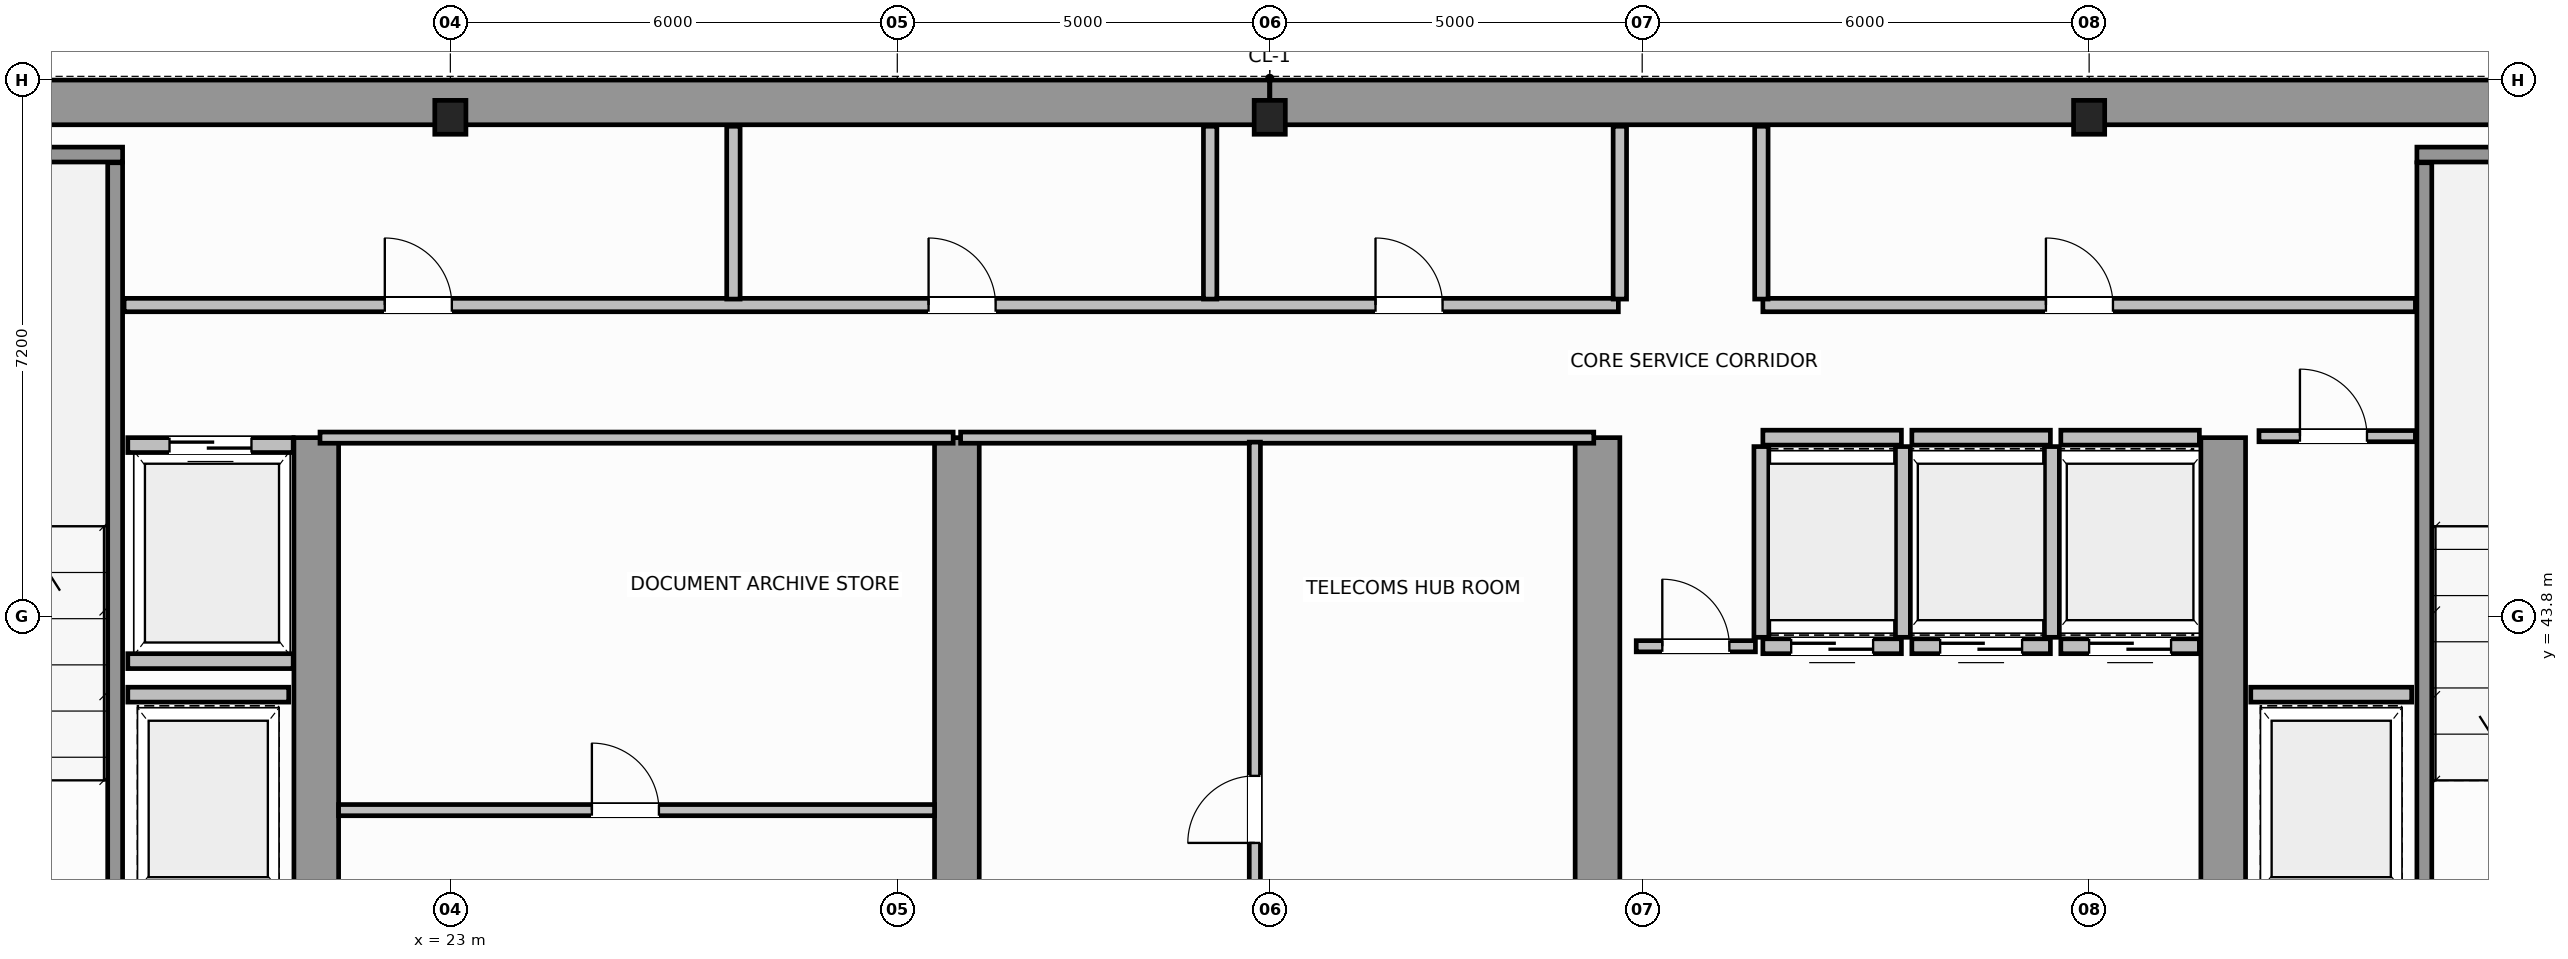
"""IFC4 building model, lengths in metres.
Left out: names, types, materials, properties, quantities, classifications, styles, units other than length and angle.
Written with IfcOpenShell. Run it as: python <this file> out.ifc"""

import sys

from ifc_helpers import new_model, si_unit, direction, frame, frame_2d, origin, origin_2d, place, context, subcontext, project, spatial, rectangle, i_section, extrude, source, transform, mapped, element, fill, save


model = new_model("IFC4")
c1 = context("Model", 3, precision=1e-05, world=origin(), true_north=direction((0.0, 1.0)))
c2 = subcontext(c1, "Body", "Model", "MODEL_VIEW")
j1 = project(units=[si_unit("LENGTHUNIT", "METRE"), si_unit("PLANEANGLEUNIT", "RADIAN")], contexts=[c1])
p1 = place(None, origin())
s1 = spatial("IfcSite", under=j1, at=p1, CompositionType="ELEMENT")
p2 = place(p1, origin())
s2 = spatial("IfcBuilding", under=s1, at=p2, CompositionType="ELEMENT")
p3 = place(p2, frame((0.0, 0.0, 227.0)))
s3 = spatial("IfcBuildingStorey", under=s2, at=p3, CompositionType="ELEMENT", Elevation=227.0)
m1 = source(origin(), c2, "Body", "SweptSolid", [
    extrude(i_section(OverallWidth=0.418, OverallDepth=0.455, WebThickness=0.042, FlangeThickness=0.058, FilletRadius=0.015, at=origin_2d()), origin(), (0.0, 0.0, 1.0), 3.8),
])
for number, where, z_axis, x_axis in (
    (1, (23.0, 50.5, 0.0), (0.0, 0.0, 1.0), (1.0, 0.0, 0.0)),
    (2, (34.0, 50.5, 0.0), (0.0, 0.0, 1.0), (1.0, 0.0, 0.0)),
    (3, (45.0, 50.5, 0.0), (0.0, 0.0, 1.0), (1.0, 0.0, 0.0)),
):
    element("IfcColumn", number, at=place(p3, frame(where, z_axis=z_axis, x_axis=x_axis)), inside=s3, PredefinedType="COLUMN", context=c2, shape_type="MappedRepresentation", body=[
        mapped(m1, transform((0.0, 0.0, 0.0), scale=1.0)),
    ])
for number, where, z_axis, x_axis in (
    (4, (14.304, 50.7, 0.0), (0.0, 0.0, 1.0), (1.0, 0.0, 0.0)),
    (5, (34.002, 50.7, 0.0), (0.0, 0.0, 1.0), (1.0, 0.0, 0.0)),
):
    element("IfcWall", number, at=place(p3, frame(where, z_axis=z_axis, x_axis=x_axis)), inside=s3, PredefinedType="SHEAR", context=c2, shape_type="SweptSolid", body=[
        extrude(rectangle(XDim=19.694, YDim=0.6, at=frame_2d((9.847, 0.0))), origin(), (0.0, 0.0, 1.0), 3.8),
    ])
for number, where, z_axis, x_axis in (
    (6, (21.2, 36.82, 0.0), (0.0, 0.0, 1.0), (0.0, 1.0, 0.0)),
    (7, (29.8, 36.82, 0.0), (0.0, 0.0, 1.0), (0.0, 1.0, 0.0)),
    (8, (38.4, 36.82, 0.0), (0.0, 0.0, 1.0), (0.0, 1.0, 0.0)),
    (9, (46.8, 36.82, 0.0), (0.0, 0.0, 1.0), (0.0, 1.0, 0.0)),
):
    element("IfcWall", number, at=place(p3, frame(where, z_axis=z_axis, x_axis=x_axis)), inside=s3, PredefinedType="SHEAR", context=c2, shape_type="SweptSolid", body=[
        extrude(rectangle(XDim=9.38, YDim=0.6, at=frame_2d((4.69, 0.0))), origin(), (0.0, 0.0, 1.0), 3.8),
    ])
p4 = place(p3, frame((14.3, 50.0, 0.0), z_axis=(0.0, 0.0, 1.0), x_axis=(1.0, 0.0, 0.0)))
e10 = element("IfcWall", 10, at=p4, inside=s3, PredefinedType="SOLIDWALL", context=c2, shape_type="SweptSolid", body=[
    extrude(rectangle(XDim=4.3, YDim=0.2, at=frame_2d((2.15, 0.0))), origin(), (0.0, 0.0, 1.0), 3.8),
])
p5 = place(p3, frame((18.5, 39.96, 0.0), z_axis=(0.0, 0.0, 1.0), x_axis=(0.0, 1.0, 0.0)))
e11 = element("IfcWall", 11, at=p5, inside=s3, PredefinedType="SOLIDWALL", context=c2, shape_type="SweptSolid", body=[
    extrude(rectangle(XDim=9.93, YDim=0.2, at=frame_2d((4.965, 0.0))), origin(), (0.0, 0.0, 1.0), 3.8),
])
p6 = place(p3, frame((49.4, 50.0, 0.0), z_axis=(0.0, 0.0, 1.0), x_axis=(1.0, 0.0, 0.0)))
e12 = element("IfcWall", 12, at=p6, inside=s3, PredefinedType="SOLIDWALL", context=c2, shape_type="SweptSolid", body=[
    extrude(rectangle(XDim=4.3, YDim=0.2, at=frame_2d((2.15, 0.0))), origin(), (0.0, 0.0, 1.0), 3.8),
])
p7 = place(p3, frame((49.5, 39.96, 0.0), z_axis=(0.0, 0.0, 1.0), x_axis=(0.0, 1.0, 0.0)))
e13 = element("IfcWall", 13, at=p7, inside=s3, PredefinedType="SOLIDWALL", context=c2, shape_type="SweptSolid", body=[
    extrude(rectangle(XDim=9.93, YDim=0.2, at=frame_2d((4.965, 0.0))), origin(), (0.0, 0.0, 1.0), 3.8),
])
p8 = place(p3, frame((40.62, 43.4, 0.0), z_axis=(0.0, 0.0, 1.0), x_axis=(1.0, 0.0, 0.0)))
e14 = element("IfcWall", 14, at=p8, inside=s3, PredefinedType="SOLIDWALL", context=c2, shape_type="SweptSolid", body=[
    extrude(rectangle(XDim=1.86, YDim=0.2, at=frame_2d((0.93, 0.0))), origin(), (0.0, 0.0, 1.0), 3.58),
])
p9 = place(p8, frame((0.38, 0.0, 0.0)))
e15 = element("IfcOpeningElement", 15, at=p9, cuts=e14, PredefinedType="OPENING", context=c2, shape_type="SweptSolid", body=[
    extrude(rectangle(XDim=1.1, YDim=2.15, at=frame_2d((0.55, 1.075))), frame((0.0, 0.11, 0.0), z_axis=(0.0, -1.0, 0.0), x_axis=(1.0, 0.0, 0.0)), (0.0, 0.0, 1.0), 0.22),
])
p10 = place(p3, frame((40.62, 46.2, 0.0), z_axis=(0.0, 0.0, 1.0), x_axis=(1.0, 0.0, 0.0)))
e16 = element("IfcWall", 16, at=p10, inside=s3, PredefinedType="SOLIDWALL", context=c2, shape_type="SweptSolid", body=[
    extrude(rectangle(XDim=1.86, YDim=0.2, at=frame_2d((0.93, 0.0))), origin(), (0.0, 0.0, 1.0), 3.58),
])
for number, where, z_axis, x_axis in (
    (17, (40.6, 43.52, 0.0), (0.0, 0.0, 1.0), (0.0, 1.0, 0.0)),
    (18, (42.5, 43.52, 0.0), (0.0, 0.0, 1.0), (0.0, 1.0, 0.0)),
):
    element("IfcWall", number, at=place(p3, frame(where, z_axis=z_axis, x_axis=x_axis)), inside=s3, PredefinedType="SOLIDWALL", context=c2, shape_type="SweptSolid", body=[
        extrude(rectangle(XDim=2.56, YDim=0.2, at=frame_2d((1.28, 0.0))), origin(), (0.0, 0.0, 1.0), 3.58),
    ])
p11 = place(p3, frame((42.62, 43.4, 0.0), z_axis=(0.0, 0.0, 1.0), x_axis=(1.0, 0.0, 0.0)))
e19 = element("IfcWall", 19, at=p11, inside=s3, PredefinedType="SOLIDWALL", context=c2, shape_type="SweptSolid", body=[
    extrude(rectangle(XDim=1.86, YDim=0.2, at=frame_2d((0.93, 0.0))), origin(), (0.0, 0.0, 1.0), 3.58),
])
p12 = place(p11, frame((0.38, 0.0, 0.0)))
e20 = element("IfcOpeningElement", 20, at=p12, cuts=e19, PredefinedType="OPENING", context=c2, shape_type="SweptSolid", body=[
    extrude(rectangle(XDim=1.1, YDim=2.15, at=frame_2d((0.55, 1.075))), frame((0.0, 0.11, 0.0), z_axis=(0.0, -1.0, 0.0), x_axis=(1.0, 0.0, 0.0)), (0.0, 0.0, 1.0), 0.22),
])
p13 = place(p3, frame((42.62, 46.2, 0.0), z_axis=(0.0, 0.0, 1.0), x_axis=(1.0, 0.0, 0.0)))
e21 = element("IfcWall", 21, at=p13, inside=s3, PredefinedType="SOLIDWALL", context=c2, shape_type="SweptSolid", body=[
    extrude(rectangle(XDim=1.86, YDim=0.2, at=frame_2d((0.93, 0.0))), origin(), (0.0, 0.0, 1.0), 3.58),
])
p14 = place(p3, frame((44.5, 43.52, 0.0), z_axis=(0.0, 0.0, 1.0), x_axis=(0.0, 1.0, 0.0)))
e22 = element("IfcWall", 22, at=p14, inside=s3, PredefinedType="SOLIDWALL", context=c2, shape_type="SweptSolid", body=[
    extrude(rectangle(XDim=2.56, YDim=0.2, at=frame_2d((1.28, 0.0))), origin(), (0.0, 0.0, 1.0), 3.58),
])
p15 = place(p3, frame((44.62, 43.4, 0.0), z_axis=(0.0, 0.0, 1.0), x_axis=(1.0, 0.0, 0.0)))
e23 = element("IfcWall", 23, at=p15, inside=s3, PredefinedType="SOLIDWALL", context=c2, shape_type="SweptSolid", body=[
    extrude(rectangle(XDim=1.86, YDim=0.2, at=frame_2d((0.93, 0.0))), origin(), (0.0, 0.0, 1.0), 3.58),
])
p16 = place(p15, frame((0.38, 0.0, 0.0)))
e24 = element("IfcOpeningElement", 24, at=p16, cuts=e23, PredefinedType="OPENING", context=c2, shape_type="SweptSolid", body=[
    extrude(rectangle(XDim=1.1, YDim=2.15, at=frame_2d((0.55, 1.075))), frame((0.0, 0.11, 0.0), z_axis=(0.0, -1.0, 0.0), x_axis=(1.0, 0.0, 0.0)), (0.0, 0.0, 1.0), 0.22),
])
p17 = place(p3, frame((44.62, 46.2, 0.0), z_axis=(0.0, 0.0, 1.0), x_axis=(1.0, 0.0, 0.0)))
e25 = element("IfcWall", 25, at=p17, inside=s3, PredefinedType="SOLIDWALL", context=c2, shape_type="SweptSolid", body=[
    extrude(rectangle(XDim=1.86, YDim=0.2, at=frame_2d((0.93, 0.0))), origin(), (0.0, 0.0, 1.0), 3.58),
])
p18 = place(p3, frame((18.67, 46.1, 0.0), z_axis=(0.0, 0.0, 1.0), x_axis=(1.0, 0.0, 0.0)))
e26 = element("IfcWall", 26, at=p18, inside=s3, PredefinedType="SOLIDWALL", context=c2, shape_type="SweptSolid", body=[
    extrude(rectangle(XDim=2.22, YDim=0.2, at=frame_2d((1.11, 0.0))), origin(), (0.0, 0.0, 1.0), 3.58),
])
p19 = place(p18, frame((0.56, 0.0, 0.0)))
e27 = element("IfcOpeningElement", 27, at=p19, cuts=e26, PredefinedType="OPENING", context=c2, shape_type="SweptSolid", body=[
    extrude(rectangle(XDim=1.1, YDim=2.15, at=frame_2d((0.55, 1.075))), frame((0.0, 0.11, 0.0), z_axis=(0.0, -1.0, 0.0), x_axis=(1.0, 0.0, 0.0)), (0.0, 0.0, 1.0), 0.22),
])
p20 = place(p3, frame((18.67, 43.2, 0.0), z_axis=(0.0, 0.0, 1.0), x_axis=(1.0, 0.0, 0.0)))
e28 = element("IfcWall", 28, at=p20, inside=s3, PredefinedType="SOLIDWALL", context=c2, shape_type="SweptSolid", body=[
    extrude(rectangle(XDim=2.22, YDim=0.2, at=frame_2d((1.11, 0.0))), origin(), (0.0, 0.0, 1.0), 3.58),
])
for number, where, z_axis, x_axis in (
    (29, (18.67, 42.75, 0.0), (0.0, 0.0, 1.0), (1.0, 0.0, 0.0)),
    (30, (47.17, 42.75, 0.0), (0.0, 0.0, 1.0), (1.0, 0.0, 0.0)),
):
    element("IfcWall", number, at=place(p3, frame(where, z_axis=z_axis, x_axis=x_axis)), inside=s3, PredefinedType="SOLIDWALL", context=c2, shape_type="SweptSolid", body=[
        extrude(rectangle(XDim=2.16, YDim=0.2, at=frame_2d((1.08, 0.0))), origin(), (0.0, 0.0, 1.0), 3.58),
    ])
p21 = place(p3, frame((21.25, 46.2, 0.0), z_axis=(0.0, 0.0, 1.0), x_axis=(1.0, 0.0, 0.0)))
e31 = element("IfcWall", 31, at=p21, inside=s3, PredefinedType="PARTITIONING", context=c2, shape_type="SweptSolid", body=[
    extrude(rectangle(XDim=8.5, YDim=0.15, at=frame_2d((4.25, 0.0))), origin(), (0.0, 0.0, 1.0), 3.58),
])
p22 = place(p3, frame((21.5, 41.2, 0.0), z_axis=(0.0, 0.0, 1.0), x_axis=(1.0, 0.0, 0.0)))
e32 = element("IfcWall", 32, at=p22, inside=s3, PredefinedType="PARTITIONING", context=c2, shape_type="SweptSolid", body=[
    extrude(rectangle(XDim=8.0, YDim=0.15, at=frame_2d((4.0, 0.0))), origin(), (0.0, 0.0, 1.0), 3.58),
])
p23 = place(p22, frame((3.4, 0.0, 0.0)))
e33 = element("IfcOpeningElement", 33, at=p23, cuts=e32, PredefinedType="OPENING", context=c2, shape_type="SweptSolid", body=[
    extrude(rectangle(XDim=0.9, YDim=2.1, at=frame_2d((0.45, 1.05))), frame((0.0, 0.085, 0.0), z_axis=(0.0, -1.0, 0.0), x_axis=(1.0, 0.0, 0.0)), (0.0, 0.0, 1.0), 0.17),
])
p24 = place(p3, frame((29.85, 46.2, 0.0), z_axis=(0.0, 0.0, 1.0), x_axis=(1.0, 0.0, 0.0)))
e34 = element("IfcWall", 34, at=p24, inside=s3, PredefinedType="PARTITIONING", context=c2, shape_type="SweptSolid", body=[
    extrude(rectangle(XDim=8.5, YDim=0.15, at=frame_2d((4.25, 0.0))), origin(), (0.0, 0.0, 1.0), 3.58),
])
p25 = place(p3, frame((33.8, 36.56, 0.0), z_axis=(0.0, 0.0, 1.0), x_axis=(0.0, 1.0, 0.0)))
e35 = element("IfcWall", 35, at=p25, inside=s3, PredefinedType="PARTITIONING", context=c2, shape_type="SweptSolid", body=[
    extrude(rectangle(XDim=9.58, YDim=0.15, at=frame_2d((4.79, 0.0))), origin(), (0.0, 0.0, 1.0), 3.58),
])
p26 = place(p25, frame((4.2, 0.0, 0.0)))
e36 = element("IfcOpeningElement", 36, at=p26, cuts=e35, PredefinedType="OPENING", context=c2, shape_type="SweptSolid", body=[
    extrude(rectangle(XDim=0.9, YDim=2.1, at=frame_2d((0.45, 1.05))), frame((0.0, 0.085, 0.0), z_axis=(0.0, -1.0, 0.0), x_axis=(1.0, 0.0, 0.0)), (0.0, 0.0, 1.0), 0.17),
])
p27 = place(p3, frame((47.28, 46.22, 0.0), z_axis=(0.0, 0.0, 1.0), x_axis=(1.0, 0.0, 0.0)))
e37 = element("IfcWall", 37, at=p27, inside=s3, PredefinedType="PARTITIONING", context=c2, shape_type="SweptSolid", body=[
    extrude(rectangle(XDim=2.1, YDim=0.15, at=frame_2d((1.05, 0.0))), origin(), (0.0, 0.0, 1.0), 3.58),
])
p28 = place(p27, frame((0.55, 0.0, 0.0)))
e38 = element("IfcOpeningElement", 38, at=p28, cuts=e37, PredefinedType="OPENING", context=c2, shape_type="SweptSolid", body=[
    extrude(rectangle(XDim=0.9, YDim=2.1, at=frame_2d((0.45, 1.05))), frame((0.0, 0.085, 0.0), z_axis=(0.0, -1.0, 0.0), x_axis=(1.0, 0.0, 0.0)), (0.0, 0.0, 1.0), 0.17),
])
p29 = place(p3, frame((38.92, 43.4, 0.0), z_axis=(0.0, 0.0, 1.0), x_axis=(1.0, 0.0, 0.0)))
e39 = element("IfcWall", 39, at=p29, inside=s3, PredefinedType="PARTITIONING", context=c2, shape_type="SweptSolid", body=[
    extrude(rectangle(XDim=1.6, YDim=0.15, at=frame_2d((0.8, 0.0))), origin(), (0.0, 0.0, 1.0), 3.58),
])
p30 = place(p29, frame((0.35, 0.0, 0.0)))
e40 = element("IfcOpeningElement", 40, at=p30, cuts=e39, PredefinedType="OPENING", context=c2, shape_type="SweptSolid", body=[
    extrude(rectangle(XDim=0.9, YDim=2.1, at=frame_2d((0.45, 1.05))), frame((0.0, 0.085, 0.0), z_axis=(0.0, -1.0, 0.0), x_axis=(1.0, 0.0, 0.0)), (0.0, 0.0, 1.0), 0.17),
])
p31 = place(p3, frame((18.62, 47.98, 0.0), z_axis=(0.0, 0.0, 1.0), x_axis=(1.0, 0.0, 0.0)))
e41 = element("IfcWall", 41, at=p31, inside=s3, PredefinedType="PLUMBINGWALL", context=c2, shape_type="SweptSolid", body=[
    extrude(rectangle(XDim=20.06, YDim=0.18, at=frame_2d((10.03, 0.0))), origin(), (0.0, 0.0, 1.0), 3.58),
])
p32 = place(p31, frame((3.5, 0.0, 0.0)))
e42 = element("IfcOpeningElement", 42, at=p32, cuts=e41, PredefinedType="OPENING", context=c2, shape_type="SweptSolid", body=[
    extrude(rectangle(XDim=0.9, YDim=2.15, at=frame_2d((0.45, 1.075))), frame((0.0, 0.1, 0.0), z_axis=(0.0, -1.0, 0.0), x_axis=(1.0, 0.0, 0.0)), (0.0, 0.0, 1.0), 0.2),
])
p33 = place(p31, frame((10.8, 0.0, 0.0)))
e43 = element("IfcOpeningElement", 43, at=p33, cuts=e41, PredefinedType="OPENING", context=c2, shape_type="SweptSolid", body=[
    extrude(rectangle(XDim=0.9, YDim=2.15, at=frame_2d((0.45, 1.075))), frame((0.0, 0.1, 0.0), z_axis=(0.0, -1.0, 0.0), x_axis=(1.0, 0.0, 0.0)), (0.0, 0.0, 1.0), 0.2),
])
p34 = place(p31, frame((16.8, 0.0, 0.0)))
e44 = element("IfcOpeningElement", 44, at=p34, cuts=e41, PredefinedType="OPENING", context=c2, shape_type="SweptSolid", body=[
    extrude(rectangle(XDim=0.9, YDim=2.15, at=frame_2d((0.45, 1.075))), frame((0.0, 0.1, 0.0), z_axis=(0.0, -1.0, 0.0), x_axis=(1.0, 0.0, 0.0)), (0.0, 0.0, 1.0), 0.2),
])
p35 = place(p3, frame((40.62, 47.98, 0.0), z_axis=(0.0, 0.0, 1.0), x_axis=(1.0, 0.0, 0.0)))
e45 = element("IfcWall", 45, at=p35, inside=s3, PredefinedType="PLUMBINGWALL", context=c2, shape_type="SweptSolid", body=[
    extrude(rectangle(XDim=8.76, YDim=0.18, at=frame_2d((4.38, 0.0))), origin(), (0.0, 0.0, 1.0), 3.58),
])
p36 = place(p35, frame((3.8, 0.0, 0.0)))
e46 = element("IfcOpeningElement", 46, at=p36, cuts=e45, PredefinedType="OPENING", context=c2, shape_type="SweptSolid", body=[
    extrude(rectangle(XDim=0.9, YDim=2.15, at=frame_2d((0.45, 1.075))), frame((0.0, 0.1, 0.0), z_axis=(0.0, -1.0, 0.0), x_axis=(1.0, 0.0, 0.0)), (0.0, 0.0, 1.0), 0.2),
])
for number, where, z_axis, x_axis in (
    (47, (26.8, 48.06, 0.0), (0.0, 0.0, 1.0), (0.0, 1.0, 0.0)),
    (48, (33.2, 48.06, 0.0), (0.0, 0.0, 1.0), (0.0, 1.0, 0.0)),
    (49, (38.7, 48.06, 0.0), (0.0, 0.0, 1.0), (0.0, 1.0, 0.0)),
    (50, (40.6, 48.06, 0.0), (0.0, 0.0, 1.0), (0.0, 1.0, 0.0)),
):
    element("IfcWall", number, at=place(p3, frame(where, z_axis=z_axis, x_axis=x_axis)), inside=s3, PredefinedType="PLUMBINGWALL", context=c2, shape_type="SweptSolid", body=[
        extrude(rectangle(XDim=2.32, YDim=0.18, at=frame_2d((1.16, 0.0))), origin(), (0.0, 0.0, 1.0), 3.58),
    ])
m2 = source(origin(), c2, "Body", "SweptSolid", [
    extrude(rectangle(XDim=1.1, YDim=2.15, at=frame_2d((0.55, 1.075))), frame((0.0, 0.025, 0.0), z_axis=(0.0, -1.0, 0.0), x_axis=(1.0, 0.0, 0.0)), (0.0, 0.0, 1.0), 0.05),
])
p37 = place(p9, origin())
e51 = element("IfcDoor", 51, at=p37, inside=s3, OperationType="DOUBLE_DOOR_SLIDING", PredefinedType="DOOR", context=c2, shape_type="MappedRepresentation", body=[
    mapped(m2, transform((0.0, 0.0, 0.0), scale=1.0)),
])
fill(e15, e51)
p38 = place(p12, origin())
e52 = element("IfcDoor", 52, at=p38, inside=s3, OperationType="DOUBLE_DOOR_SLIDING", PredefinedType="DOOR", context=c2, shape_type="MappedRepresentation", body=[
    mapped(m2, transform((0.0, 0.0, 0.0), scale=1.0)),
])
fill(e20, e52)
p39 = place(p16, origin())
e53 = element("IfcDoor", 53, at=p39, inside=s3, OperationType="DOUBLE_DOOR_SLIDING", PredefinedType="DOOR", context=c2, shape_type="MappedRepresentation", body=[
    mapped(m2, transform((0.0, 0.0, 0.0), scale=1.0)),
])
fill(e24, e53)
p40 = place(p19, origin())
e54 = element("IfcDoor", 54, at=p40, inside=s3, OperationType="DOUBLE_DOOR_SLIDING", PredefinedType="DOOR", context=c2, shape_type="MappedRepresentation", body=[
    mapped(m2, transform((0.0, 0.0, 0.0), scale=1.0)),
])
fill(e27, e54)
m3 = source(origin(), c2, "Body", "SweptSolid", [
    extrude(rectangle(XDim=0.9, YDim=2.1, at=frame_2d((0.45, 1.05))), frame((0.0, 0.025, 0.0), z_axis=(0.0, -1.0, 0.0), x_axis=(1.0, 0.0, 0.0)), (0.0, 0.0, 1.0), 0.05),
])
p41 = place(p23, origin())
e55 = element("IfcDoor", 55, at=p41, inside=s3, OperationType="SINGLE_SWING_RIGHT", PredefinedType="DOOR", context=c2, shape_type="MappedRepresentation", body=[
    mapped(m3, transform((0.0, 0.0, 0.0), scale=1.0)),
])
fill(e33, e55)
p42 = place(p26, origin())
e56 = element("IfcDoor", 56, at=p42, inside=s3, OperationType="SINGLE_SWING_RIGHT", PredefinedType="DOOR", context=c2, shape_type="MappedRepresentation", body=[
    mapped(m3, transform((0.0, 0.0, 0.0), scale=1.0)),
])
fill(e36, e56)
p43 = place(p28, origin())
e57 = element("IfcDoor", 57, at=p43, inside=s3, OperationType="SINGLE_SWING_RIGHT", PredefinedType="DOOR", context=c2, shape_type="MappedRepresentation", body=[
    mapped(m3, transform((0.0, 0.0, 0.0), scale=1.0)),
])
fill(e38, e57)
p44 = place(p30, origin())
e58 = element("IfcDoor", 58, at=p44, inside=s3, OperationType="SINGLE_SWING_LEFT", PredefinedType="DOOR", context=c2, shape_type="MappedRepresentation", body=[
    mapped(m3, transform((0.0, 0.0, 0.0), scale=1.0)),
])
fill(e40, e58)
m4 = source(origin(), c2, "Body", "SweptSolid", [
    extrude(rectangle(XDim=0.9, YDim=2.15, at=frame_2d((0.45, 1.075))), frame((0.0, 0.025, 0.0), z_axis=(0.0, -1.0, 0.0), x_axis=(1.0, 0.0, 0.0)), (0.0, 0.0, 1.0), 0.05),
])
p45 = place(p32, origin())
e59 = element("IfcDoor", 59, at=p45, inside=s3, OperationType="SINGLE_SWING_LEFT", PredefinedType="DOOR", context=c2, shape_type="MappedRepresentation", body=[
    mapped(m4, transform((0.0, 0.0, 0.0), scale=1.0)),
])
fill(e42, e59)
p46 = place(p33, origin())
e60 = element("IfcDoor", 60, at=p46, inside=s3, OperationType="SINGLE_SWING_RIGHT", PredefinedType="DOOR", context=c2, shape_type="MappedRepresentation", body=[
    mapped(m4, transform((0.0, 0.0, 0.0), scale=1.0)),
])
fill(e43, e60)
p47 = place(p34, origin())
e61 = element("IfcDoor", 61, at=p47, inside=s3, OperationType="SINGLE_SWING_LEFT", PredefinedType="DOOR", context=c2, shape_type="MappedRepresentation", body=[
    mapped(m4, transform((0.0, 0.0, 0.0), scale=1.0)),
])
fill(e44, e61)
p48 = place(p36, origin())
e62 = element("IfcDoor", 62, at=p48, inside=s3, OperationType="SINGLE_SWING_RIGHT", PredefinedType="DOOR", context=c2, shape_type="MappedRepresentation", body=[
    mapped(m4, transform((0.0, 0.0, 0.0), scale=1.0)),
])
fill(e46, e62)
save(model, sys.argv[1])
